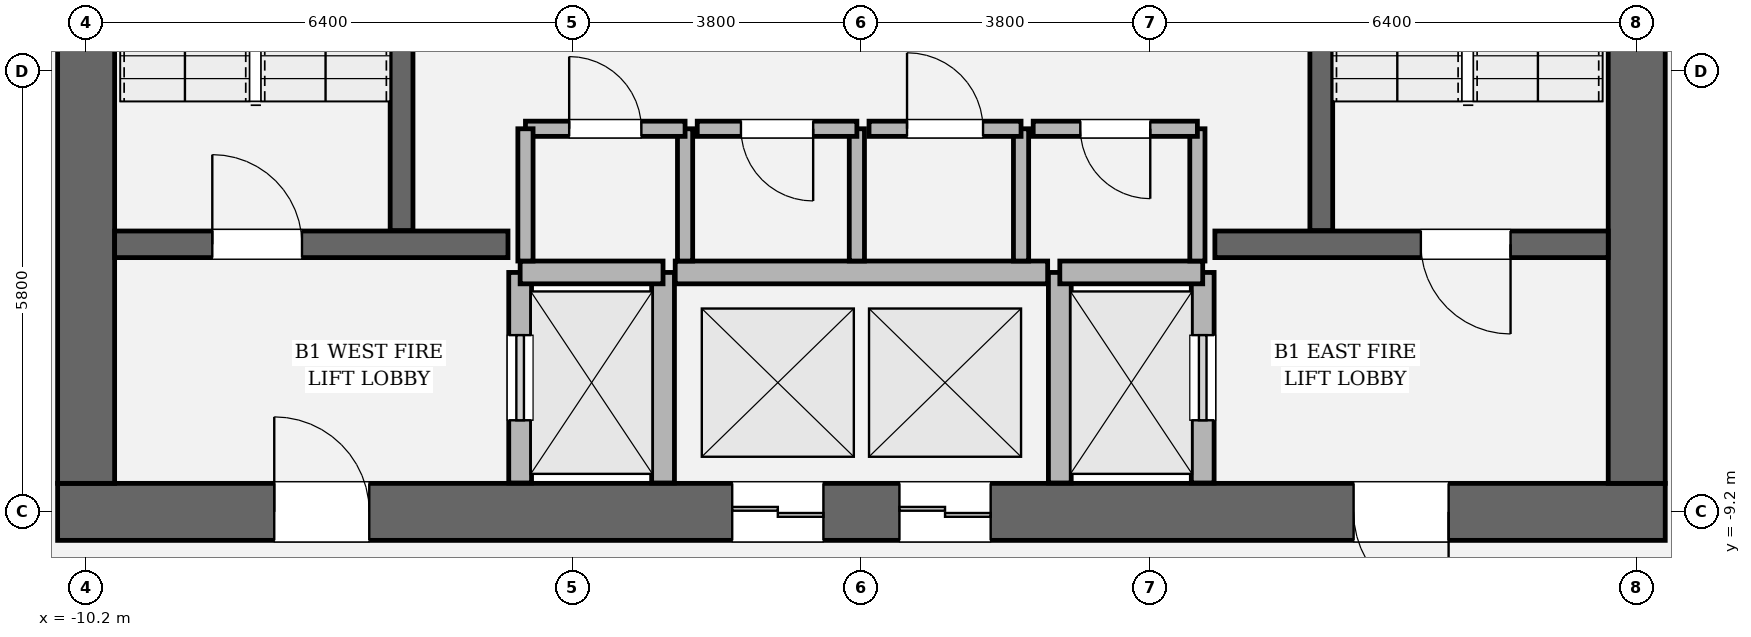
"""IFC4 building model, lengths in metres.
Left out: names, types, materials, properties, quantities, classifications, styles, units other than length and angle.
Written with IfcOpenShell. Run it as: python <this file> out.ifc"""

import sys

from ifc_helpers import new_model, si_unit, direction, frame, frame_2d, origin, place, context, subcontext, project, spatial, rectangle, extrude, element, fill, save


model = new_model("IFC4")
c1 = context("Model", 3, precision=1e-05, world=origin(), true_north=direction((0.0, 1.0)))
c2 = subcontext(c1, "Body", "Model", "MODEL_VIEW")
j1 = project(units=[si_unit("LENGTHUNIT", "METRE"), si_unit("PLANEANGLEUNIT", "RADIAN")], contexts=[c1])
p1 = place(None, origin())
s1 = spatial("IfcSite", under=j1, at=p1, CompositionType="ELEMENT")
p2 = place(p1, origin())
s2 = spatial("IfcBuilding", under=s1, at=p2, CompositionType="ELEMENT")
p3 = place(p2, frame((0.0, 0.0, -4.8)))
s3 = spatial("IfcBuildingStorey", under=s2, at=p3, CompositionType="ELEMENT", Elevation=-4.8)
p4 = place(p3, frame((10.575, -9.2, 0.0), z_axis=(0.0, 0.0, 1.0), x_axis=(-1.0, 0.0, 0.0)))
e1 = element("IfcWall", 1, at=p4, inside=s3, PredefinedType="SHEAR", context=c2, shape_type="SweptSolid", body=[
    extrude(rectangle(XDim=21.15, YDim=0.75, at=frame_2d((10.575, 0.0))), origin(), (0.0, 0.0, 1.0), 4.8),
])
p5 = place(p4, frame((2.85, 0.0, 0.0)))
e2 = element("IfcOpeningElement", 2, at=p5, cuts=e1, PredefinedType="OPENING", context=c2, shape_type="SweptSolid", body=[
    extrude(rectangle(XDim=1.25, YDim=2.25, at=frame_2d((0.625, 1.125))), frame((0.0, 0.385, 0.0), z_axis=(0.0, -1.0, 0.0), x_axis=(1.0, 0.0, 0.0)), (0.0, 0.0, 1.0), 0.77),
])
p6 = place(p4, frame((17.05, 0.0, 0.0)))
e3 = element("IfcOpeningElement", 3, at=p6, cuts=e1, PredefinedType="OPENING", context=c2, shape_type="SweptSolid", body=[
    extrude(rectangle(XDim=1.25, YDim=2.25, at=frame_2d((0.625, 1.125))), frame((0.0, 0.385, 0.0), z_axis=(0.0, -1.0, 0.0), x_axis=(1.0, 0.0, 0.0)), (0.0, 0.0, 1.0), 0.77),
])
p7 = place(p4, frame((11.075, 0.0, 0.0)))
e4 = element("IfcOpeningElement", 4, at=p7, cuts=e1, PredefinedType="OPENING", context=c2, shape_type="SweptSolid", body=[
    extrude(rectangle(XDim=1.2, YDim=2.3, at=frame_2d((0.6, 1.15))), frame((0.0, 0.385, 0.0), z_axis=(0.0, -1.0, 0.0), x_axis=(1.0, 0.0, 0.0)), (0.0, 0.0, 1.0), 0.77),
])
p8 = place(p4, frame((8.875, 0.0, 0.0)))
e5 = element("IfcOpeningElement", 5, at=p8, cuts=e1, PredefinedType="OPENING", context=c2, shape_type="SweptSolid", body=[
    extrude(rectangle(XDim=1.2, YDim=2.3, at=frame_2d((0.6, 1.15))), frame((0.0, 0.385, 0.0), z_axis=(0.0, -1.0, 0.0), x_axis=(1.0, 0.0, 0.0)), (0.0, 0.0, 1.0), 0.77),
])
p9 = place(p3, frame((-10.2, -8.825, 0.0), z_axis=(0.0, 0.0, 1.0), x_axis=(0.0, 1.0, 0.0)))
e6 = element("IfcWall", 6, at=p9, inside=s3, PredefinedType="SHEAR", context=c2, shape_type="SweptSolid", body=[
    extrude(rectangle(XDim=17.65, YDim=0.75, at=frame_2d((8.825, 0.0))), origin(), (0.0, 0.0, 1.0), 4.8),
])
p10 = place(p9, frame((12.615, 0.0, 0.0)))
e7 = element("IfcOpeningElement", 7, at=p10, cuts=e6, PredefinedType="OPENING", context=c2, shape_type="SweptSolid", body=[
    extrude(rectangle(XDim=1.18, YDim=2.2, at=frame_2d((0.59, 1.1))), frame((0.0, 0.385, 0.0), z_axis=(0.0, -1.0, 0.0), x_axis=(1.0, 0.0, 0.0)), (0.0, 0.0, 1.0), 0.77),
])
p11 = place(p3, frame((10.2, 8.825, 0.0), z_axis=(0.0, 0.0, 1.0), x_axis=(0.0, -1.0, 0.0)))
e8 = element("IfcWall", 8, at=p11, inside=s3, PredefinedType="SHEAR", context=c2, shape_type="SweptSolid", body=[
    extrude(rectangle(XDim=17.65, YDim=0.75, at=frame_2d((8.825, 0.0))), origin(), (0.0, 0.0, 1.0), 4.8),
])
p12 = place(p11, frame((3.855, 0.0, 0.0)))
e9 = element("IfcOpeningElement", 9, at=p12, cuts=e8, PredefinedType="OPENING", context=c2, shape_type="SweptSolid", body=[
    extrude(rectangle(XDim=1.18, YDim=2.2, at=frame_2d((0.59, 1.1))), frame((0.0, 0.385, 0.0), z_axis=(0.0, -1.0, 0.0), x_axis=(1.0, 0.0, 0.0)), (0.0, 0.0, 1.0), 0.77),
])
for number, where, z_axis, x_axis in (
    (10, (-6.05, -5.5, 0.0), (0.0, 0.0, 1.0), (0.0, 1.0, 0.0)),
    (11, (6.05, 3.45, 0.0), (0.0, 0.0, 1.0), (0.0, -1.0, 0.0)),
):
    element("IfcWall", number, at=place(p3, frame(where, z_axis=z_axis, x_axis=x_axis)), inside=s3, PredefinedType="SOLIDWALL", context=c2, shape_type="SweptSolid", body=[
        extrude(rectangle(XDim=8.95, YDim=0.3, at=frame_2d((4.475, 0.0))), origin(), (0.0, 0.0, 1.0), 4.8),
    ])
p13 = place(p3, frame((-9.825, -5.68, 0.0), z_axis=(0.0, 0.0, 1.0), x_axis=(1.0, 0.0, 0.0)))
e12 = element("IfcWall", 12, at=p13, inside=s3, PredefinedType="SOLIDWALL", context=c2, shape_type="SweptSolid", body=[
    extrude(rectangle(XDim=5.175, YDim=0.35, at=frame_2d((2.587, 0.0))), origin(), (0.0, 0.0, 1.0), 4.8),
])
p14 = place(p13, frame((1.285, 0.0, 0.0)))
e13 = element("IfcOpeningElement", 13, at=p14, cuts=e12, PredefinedType="OPENING", context=c2, shape_type="SweptSolid", body=[
    extrude(rectangle(XDim=1.18, YDim=2.2, at=frame_2d((0.59, 1.1))), frame((0.0, 0.185, 0.0), z_axis=(0.0, -1.0, 0.0), x_axis=(1.0, 0.0, 0.0)), (0.0, 0.0, 1.0), 0.37),
])
p15 = place(p3, frame((4.65, -5.68, 0.0), z_axis=(0.0, 0.0, 1.0), x_axis=(1.0, 0.0, 0.0)))
e14 = element("IfcWall", 14, at=p15, inside=s3, PredefinedType="SOLIDWALL", context=c2, shape_type="SweptSolid", body=[
    extrude(rectangle(XDim=5.175, YDim=0.35, at=frame_2d((2.587, 0.0))), origin(), (0.0, 0.0, 1.0), 4.8),
])
p16 = place(p15, frame((2.71, 0.0, 0.0)))
e15 = element("IfcOpeningElement", 15, at=p16, cuts=e14, PredefinedType="OPENING", context=c2, shape_type="SweptSolid", body=[
    extrude(rectangle(XDim=1.18, YDim=2.2, at=frame_2d((0.59, 1.1))), frame((0.0, 0.185, 0.0), z_axis=(0.0, -1.0, 0.0), x_axis=(1.0, 0.0, 0.0)), (0.0, 0.0, 1.0), 0.37),
])
p17 = place(p3, frame((-4.49, -8.82, 0.0), z_axis=(0.0, 0.0, 1.0), x_axis=(0.0, 1.0, 0.0)))
e16 = element("IfcWall", 16, at=p17, inside=s3, PredefinedType="SOLIDWALL", context=c2, shape_type="SweptSolid", body=[
    extrude(rectangle(XDim=2.77, YDim=0.3, at=frame_2d((1.385, 0.0))), origin(), (0.0, 0.0, 1.0), 4.52),
])
p18 = place(p17, frame((0.825, 0.0, 0.0)))
e17 = element("IfcOpeningElement", 17, at=p18, cuts=e16, PredefinedType="OPENING", context=c2, shape_type="SweptSolid", body=[
    extrude(rectangle(XDim=1.12, YDim=2.25, at=frame_2d((0.56, 1.125))), frame((0.0, 0.16, 0.0), z_axis=(0.0, -1.0, 0.0), x_axis=(1.0, 0.0, 0.0)), (0.0, 0.0, 1.0), 0.32),
])
p19 = place(p3, frame((-2.61, -8.82, 0.0), z_axis=(0.0, 0.0, 1.0), x_axis=(0.0, 1.0, 0.0)))
e18 = element("IfcWall", 18, at=p19, inside=s3, PredefinedType="SOLIDWALL", context=c2, shape_type="SweptSolid", body=[
    extrude(rectangle(XDim=2.77, YDim=0.3, at=frame_2d((1.385, 0.0))), origin(), (0.0, 0.0, 1.0), 4.52),
])
p20 = place(p3, frame((-4.49, -6.05, 0.0), z_axis=(0.0, 0.0, 1.0), x_axis=(1.0, 0.0, 0.0)))
e19 = element("IfcWall", 19, at=p20, inside=s3, PredefinedType="SOLIDWALL", context=c2, shape_type="SweptSolid", body=[
    extrude(rectangle(XDim=1.88, YDim=0.3, at=frame_2d((0.94, 0.0))), origin(), (0.0, 0.0, 1.0), 4.52),
])
p21 = place(p3, frame((4.49, -8.82, 0.0), z_axis=(0.0, 0.0, 1.0), x_axis=(0.0, 1.0, 0.0)))
e20 = element("IfcWall", 20, at=p21, inside=s3, PredefinedType="SOLIDWALL", context=c2, shape_type="SweptSolid", body=[
    extrude(rectangle(XDim=2.77, YDim=0.3, at=frame_2d((1.385, 0.0))), origin(), (0.0, 0.0, 1.0), 4.52),
])
p22 = place(p21, frame((0.825, 0.0, 0.0)))
e21 = element("IfcOpeningElement", 21, at=p22, cuts=e20, PredefinedType="OPENING", context=c2, shape_type="SweptSolid", body=[
    extrude(rectangle(XDim=1.12, YDim=2.25, at=frame_2d((0.56, 1.125))), frame((0.0, 0.16, 0.0), z_axis=(0.0, -1.0, 0.0), x_axis=(1.0, 0.0, 0.0)), (0.0, 0.0, 1.0), 0.32),
])
p23 = place(p3, frame((2.61, -8.82, 0.0), z_axis=(0.0, 0.0, 1.0), x_axis=(0.0, 1.0, 0.0)))
e22 = element("IfcWall", 22, at=p23, inside=s3, PredefinedType="SOLIDWALL", context=c2, shape_type="SweptSolid", body=[
    extrude(rectangle(XDim=2.77, YDim=0.3, at=frame_2d((1.385, 0.0))), origin(), (0.0, 0.0, 1.0), 4.52),
])
p24 = place(p3, frame((2.61, -6.05, 0.0), z_axis=(0.0, 0.0, 1.0), x_axis=(1.0, 0.0, 0.0)))
e23 = element("IfcWall", 23, at=p24, inside=s3, PredefinedType="SOLIDWALL", context=c2, shape_type="SweptSolid", body=[
    extrude(rectangle(XDim=1.88, YDim=0.3, at=frame_2d((0.94, 0.0))), origin(), (0.0, 0.0, 1.0), 4.52),
])
p25 = place(p3, frame((-2.45, -6.05, 0.0), z_axis=(0.0, 0.0, 1.0), x_axis=(1.0, 0.0, 0.0)))
e24 = element("IfcWall", 24, at=p25, inside=s3, PredefinedType="SOLIDWALL", context=c2, shape_type="SweptSolid", body=[
    extrude(rectangle(XDim=4.9, YDim=0.3, at=frame_2d((2.45, 0.0))), origin(), (0.0, 0.0, 1.0), 4.52),
])
p26 = place(p3, frame((-2.32, -5.9, 0.0), z_axis=(0.0, 0.0, 1.0), x_axis=(0.0, 1.0, 0.0)))
e25 = element("IfcWall", 25, at=p26, inside=s3, PredefinedType="SOLIDWALL", context=c2, shape_type="SweptSolid", body=[
    extrude(rectangle(XDim=1.74, YDim=0.2, at=frame_2d((0.87, 0.0))), origin(), (0.0, 0.0, 1.0), 4.52),
])
p27 = place(p3, frame((-2.32, -4.16, 0.0), z_axis=(0.0, 0.0, 1.0), x_axis=(-1.0, 0.0, 0.0)))
e26 = element("IfcWall", 26, at=p27, inside=s3, PredefinedType="SOLIDWALL", context=c2, shape_type="SweptSolid", body=[
    extrude(rectangle(XDim=2.1, YDim=0.2, at=frame_2d((1.05, 0.0))), origin(), (0.0, 0.0, 1.0), 4.52),
])
p28 = place(p27, frame((0.575, 0.0, 0.0)))
e27 = element("IfcOpeningElement", 27, at=p28, cuts=e26, PredefinedType="OPENING", context=c2, shape_type="SweptSolid", body=[
    extrude(rectangle(XDim=0.95, YDim=2.15, at=frame_2d((0.475, 1.075))), frame((0.0, 0.11, 0.0), z_axis=(0.0, -1.0, 0.0), x_axis=(1.0, 0.0, 0.0)), (0.0, 0.0, 1.0), 0.22),
])
for number, where, z_axis, x_axis in (
    (28, (-4.42, -4.16, 0.0), (0.0, 0.0, 1.0), (0.0, -1.0, 0.0)),
    (29, (-0.06, -5.9, 0.0), (0.0, 0.0, 1.0), (0.0, 1.0, 0.0)),
):
    element("IfcWall", number, at=place(p3, frame(where, z_axis=z_axis, x_axis=x_axis)), inside=s3, PredefinedType="SOLIDWALL", context=c2, shape_type="SweptSolid", body=[
        extrude(rectangle(XDim=1.74, YDim=0.2, at=frame_2d((0.87, 0.0))), origin(), (0.0, 0.0, 1.0), 4.52),
    ])
p29 = place(p3, frame((-0.06, -4.16, 0.0), z_axis=(0.0, 0.0, 1.0), x_axis=(-1.0, 0.0, 0.0)))
e30 = element("IfcWall", 30, at=p29, inside=s3, PredefinedType="SOLIDWALL", context=c2, shape_type="SweptSolid", body=[
    extrude(rectangle(XDim=2.1, YDim=0.2, at=frame_2d((1.05, 0.0))), origin(), (0.0, 0.0, 1.0), 4.52),
])
p30 = place(p29, frame((0.575, 0.0, 0.0)))
e31 = element("IfcOpeningElement", 31, at=p30, cuts=e30, PredefinedType="OPENING", context=c2, shape_type="SweptSolid", body=[
    extrude(rectangle(XDim=0.95, YDim=2.15, at=frame_2d((0.475, 1.075))), frame((0.0, 0.11, 0.0), z_axis=(0.0, -1.0, 0.0), x_axis=(1.0, 0.0, 0.0)), (0.0, 0.0, 1.0), 0.22),
])
p31 = place(p3, frame((2.1, -5.9, 0.0), z_axis=(0.0, 0.0, 1.0), x_axis=(0.0, 1.0, 0.0)))
e32 = element("IfcWall", 32, at=p31, inside=s3, PredefinedType="SOLIDWALL", context=c2, shape_type="SweptSolid", body=[
    extrude(rectangle(XDim=1.74, YDim=0.2, at=frame_2d((0.87, 0.0))), origin(), (0.0, 0.0, 1.0), 4.52),
])
p32 = place(p3, frame((2.1, -4.16, 0.0), z_axis=(0.0, 0.0, 1.0), x_axis=(-1.0, 0.0, 0.0)))
e33 = element("IfcWall", 33, at=p32, inside=s3, PredefinedType="SOLIDWALL", context=c2, shape_type="SweptSolid", body=[
    extrude(rectangle(XDim=2.0, YDim=0.2, at=frame_2d((1.0, 0.0))), origin(), (0.0, 0.0, 1.0), 4.52),
])
p33 = place(p32, frame((0.5, 0.0, 0.0)))
e34 = element("IfcOpeningElement", 34, at=p33, cuts=e33, PredefinedType="OPENING", context=c2, shape_type="SweptSolid", body=[
    extrude(rectangle(XDim=1.0, YDim=2.15, at=frame_2d((0.5, 1.075))), frame((0.0, 0.11, 0.0), z_axis=(0.0, -1.0, 0.0), x_axis=(1.0, 0.0, 0.0)), (0.0, 0.0, 1.0), 0.22),
])
p34 = place(p3, frame((4.42, -5.9, 0.0), z_axis=(0.0, 0.0, 1.0), x_axis=(0.0, 1.0, 0.0)))
e35 = element("IfcWall", 35, at=p34, inside=s3, PredefinedType="SOLIDWALL", context=c2, shape_type="SweptSolid", body=[
    extrude(rectangle(XDim=1.74, YDim=0.2, at=frame_2d((0.87, 0.0))), origin(), (0.0, 0.0, 1.0), 4.52),
])
p35 = place(p3, frame((4.42, -4.16, 0.0), z_axis=(0.0, 0.0, 1.0), x_axis=(-1.0, 0.0, 0.0)))
e36 = element("IfcWall", 36, at=p35, inside=s3, PredefinedType="SOLIDWALL", context=c2, shape_type="SweptSolid", body=[
    extrude(rectangle(XDim=2.16, YDim=0.2, at=frame_2d((1.08, 0.0))), origin(), (0.0, 0.0, 1.0), 4.52),
])
p36 = place(p35, frame((0.62, 0.0, 0.0)))
e37 = element("IfcOpeningElement", 37, at=p36, cuts=e36, PredefinedType="OPENING", context=c2, shape_type="SweptSolid", body=[
    extrude(rectangle(XDim=0.92, YDim=2.1, at=frame_2d((0.46, 1.05))), frame((0.0, 0.11, 0.0), z_axis=(0.0, -1.0, 0.0), x_axis=(1.0, 0.0, 0.0)), (0.0, 0.0, 1.0), 0.22),
])
p37 = place(p14, origin())
e38 = element("IfcDoor", 38, at=p37, inside=s3, OperationType="SINGLE_SWING_LEFT", PredefinedType="DOOR", context=c2, shape_type="SweptSolid", body=[
    extrude(rectangle(XDim=1.18, YDim=2.2, at=frame_2d((0.59, 1.1))), frame((0.0, 0.025, 0.0), z_axis=(0.0, -1.0, 0.0), x_axis=(1.0, 0.0, 0.0)), (0.0, 0.0, 1.0), 0.05),
])
fill(e13, e38)
p38 = place(p16, origin())
e39 = element("IfcDoor", 39, at=p38, inside=s3, OperationType="SINGLE_SWING_RIGHT", PredefinedType="DOOR", context=c2, shape_type="SweptSolid", body=[
    extrude(rectangle(XDim=1.18, YDim=2.2, at=frame_2d((0.59, 1.1))), frame((0.0, 0.025, 0.0), z_axis=(0.0, -1.0, 0.0), x_axis=(1.0, 0.0, 0.0)), (0.0, 0.0, 1.0), 0.05),
])
fill(e15, e39)
p39 = place(p5, origin())
e40 = element("IfcDoor", 40, at=p39, inside=s3, OperationType="SINGLE_SWING_LEFT", PredefinedType="DOOR", context=c2, shape_type="SweptSolid", body=[
    extrude(rectangle(XDim=1.25, YDim=2.25, at=frame_2d((0.625, 1.125))), frame((0.0, 0.025, 0.0), z_axis=(0.0, -1.0, 0.0), x_axis=(1.0, 0.0, 0.0)), (0.0, 0.0, 1.0), 0.05),
])
fill(e2, e40)
p40 = place(p6, origin())
e41 = element("IfcDoor", 41, at=p40, inside=s3, OperationType="SINGLE_SWING_RIGHT", PredefinedType="DOOR", context=c2, shape_type="SweptSolid", body=[
    extrude(rectangle(XDim=1.25, YDim=2.25, at=frame_2d((0.625, 1.125))), frame((0.0, 0.025, 0.0), z_axis=(0.0, -1.0, 0.0), x_axis=(1.0, 0.0, 0.0)), (0.0, 0.0, 1.0), 0.05),
])
fill(e3, e41)
p41 = place(p18, origin())
e42 = element("IfcDoor", 42, at=p41, inside=s3, OperationType="SLIDING_TO_LEFT", PredefinedType="DOOR", context=c2, shape_type="SweptSolid", body=[
    extrude(rectangle(XDim=1.12, YDim=2.25, at=frame_2d((0.56, 1.125))), frame((0.0, 0.025, 0.0), z_axis=(0.0, -1.0, 0.0), x_axis=(1.0, 0.0, 0.0)), (0.0, 0.0, 1.0), 0.05),
])
fill(e17, e42)
p42 = place(p22, origin())
e43 = element("IfcDoor", 43, at=p42, inside=s3, OperationType="SLIDING_TO_RIGHT", PredefinedType="DOOR", context=c2, shape_type="SweptSolid", body=[
    extrude(rectangle(XDim=1.12, YDim=2.25, at=frame_2d((0.56, 1.125))), frame((0.0, 0.025, 0.0), z_axis=(0.0, -1.0, 0.0), x_axis=(1.0, 0.0, 0.0)), (0.0, 0.0, 1.0), 0.05),
])
fill(e21, e43)
p43 = place(p7, origin())
e44 = element("IfcDoor", 44, at=p43, inside=s3, OperationType="DOUBLE_DOOR_SLIDING", PredefinedType="DOOR", context=c2, shape_type="SweptSolid", body=[
    extrude(rectangle(XDim=1.2, YDim=2.3, at=frame_2d((0.6, 1.15))), frame((0.0, 0.025, 0.0), z_axis=(0.0, -1.0, 0.0), x_axis=(1.0, 0.0, 0.0)), (0.0, 0.0, 1.0), 0.05),
])
fill(e4, e44)
p44 = place(p8, origin())
e45 = element("IfcDoor", 45, at=p44, inside=s3, OperationType="DOUBLE_DOOR_SLIDING", PredefinedType="DOOR", context=c2, shape_type="SweptSolid", body=[
    extrude(rectangle(XDim=1.2, YDim=2.3, at=frame_2d((0.6, 1.15))), frame((0.0, 0.025, 0.0), z_axis=(0.0, -1.0, 0.0), x_axis=(1.0, 0.0, 0.0)), (0.0, 0.0, 1.0), 0.05),
])
fill(e5, e45)
p45 = place(p28, origin())
e46 = element("IfcDoor", 46, at=p45, inside=s3, OperationType="SINGLE_SWING_RIGHT", PredefinedType="DOOR", context=c2, shape_type="SweptSolid", body=[
    extrude(rectangle(XDim=0.95, YDim=2.15, at=frame_2d((0.475, 1.075))), frame((0.0, 0.025, 0.0), z_axis=(0.0, -1.0, 0.0), x_axis=(1.0, 0.0, 0.0)), (0.0, 0.0, 1.0), 0.05),
])
fill(e27, e46)
p46 = place(p30, origin())
e47 = element("IfcDoor", 47, at=p46, inside=s3, OperationType="SINGLE_SWING_LEFT", PredefinedType="DOOR", context=c2, shape_type="SweptSolid", body=[
    extrude(rectangle(XDim=0.95, YDim=2.15, at=frame_2d((0.475, 1.075))), frame((0.0, 0.025, 0.0), z_axis=(0.0, -1.0, 0.0), x_axis=(1.0, 0.0, 0.0)), (0.0, 0.0, 1.0), 0.05),
])
fill(e31, e47)
p47 = place(p33, origin())
e48 = element("IfcDoor", 48, at=p47, inside=s3, OperationType="SINGLE_SWING_RIGHT", PredefinedType="DOOR", context=c2, shape_type="SweptSolid", body=[
    extrude(rectangle(XDim=1.0, YDim=2.15, at=frame_2d((0.5, 1.075))), frame((0.0, 0.025, 0.0), z_axis=(0.0, -1.0, 0.0), x_axis=(1.0, 0.0, 0.0)), (0.0, 0.0, 1.0), 0.05),
])
fill(e34, e48)
p48 = place(p36, origin())
e49 = element("IfcDoor", 49, at=p48, inside=s3, OperationType="SINGLE_SWING_LEFT", PredefinedType="DOOR", context=c2, shape_type="SweptSolid", body=[
    extrude(rectangle(XDim=0.92, YDim=2.1, at=frame_2d((0.46, 1.05))), frame((0.0, 0.025, 0.0), z_axis=(0.0, -1.0, 0.0), x_axis=(1.0, 0.0, 0.0)), (0.0, 0.0, 1.0), 0.05),
])
fill(e37, e49)
save(model, sys.argv[1])
